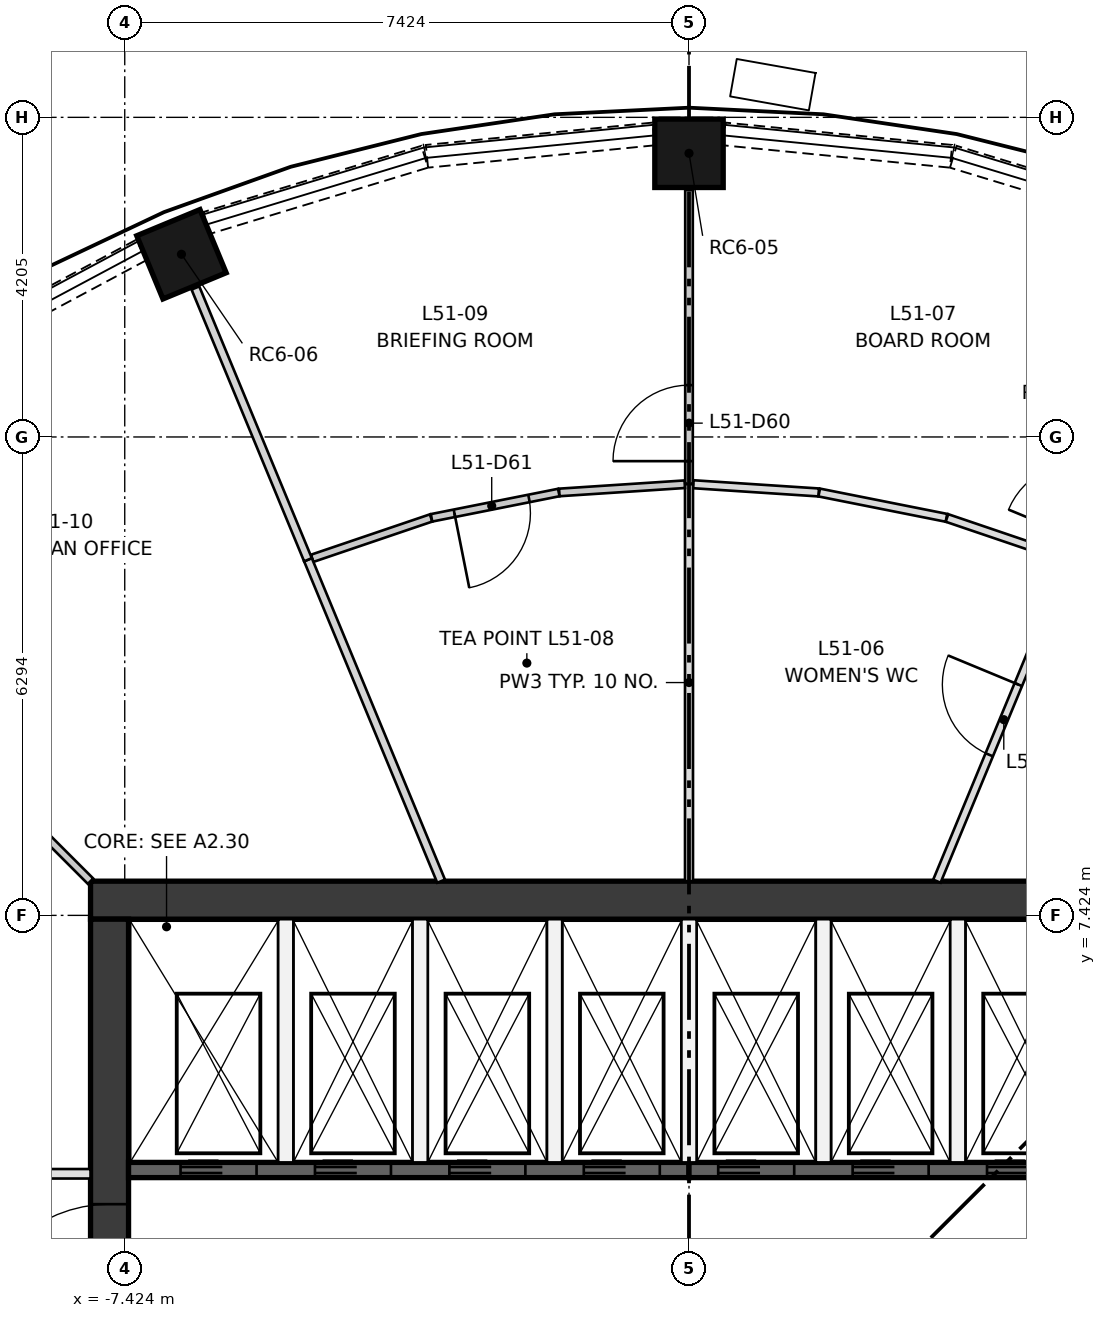
"""IFC4 building model, lengths in metres.
Left out: names, types, materials, properties, quantities, classifications, styles, units other than length and angle.
Written with IfcOpenShell. Run it as: python <this file> out.ifc"""

import sys

from ifc_helpers import new_model, si_unit, direction, frame, frame_2d, origin, origin_2d, place, context, subcontext, project, spatial, rectangle, extrude, element, fill, save


model = new_model("IFC4")
c1 = context("Model", 3, precision=1e-05, world=origin(), true_north=direction((0.0, 1.0)))
c2 = subcontext(c1, "Body", "Model", "MODEL_VIEW")
j1 = project(units=[si_unit("LENGTHUNIT", "METRE"), si_unit("PLANEANGLEUNIT", "RADIAN")], contexts=[c1])
p1 = place(None, origin())
s1 = spatial("IfcSite", under=j1, at=p1, CompositionType="ELEMENT")
p2 = place(p1, origin())
s2 = spatial("IfcBuilding", under=s1, at=p2, CompositionType="ELEMENT")
p3 = place(p2, frame((0.0, 0.0, 191.0)))
s3 = spatial("IfcBuildingStorey", under=s2, at=p3, CompositionType="ELEMENT", Elevation=191.0)
for number, where, z_axis, x_axis in (
    (1, (0.0, 17.45, 0.0), (0.0, 0.0, 1.0), (0.0, 1.0, 0.0)),
    (2, (-6.678, 16.122, 0.0), (0.0, 0.0, 1.0), (-0.383, 0.924, 0.0)),
):
    element("IfcColumn", number, at=place(p3, frame(where, z_axis=z_axis, x_axis=x_axis)), inside=s3, PredefinedType="COLUMN", context=c2, shape_type="SweptSolid", body=[
        extrude(rectangle(XDim=0.9, YDim=0.9, at=origin_2d()), origin(), (0.0, 0.0, 1.0), 2.85),
    ])
p4 = place(p3, frame((-7.874, 7.624, 0.0), z_axis=(0.0, 0.0, 1.0), x_axis=(1.0, 0.0, 0.0)))
e3 = element("IfcWall", 3, at=p4, inside=s3, PredefinedType="SHEAR", context=c2, shape_type="SweptSolid", body=[
    extrude(rectangle(XDim=15.748, YDim=0.5, at=frame_2d((7.874, 0.0))), origin(), (0.0, 0.0, 1.0), 3.35),
])
p5 = place(p3, frame((-7.624, -7.374, 0.0), z_axis=(0.0, 0.0, 1.0), x_axis=(0.0, 1.0, 0.0)))
e4 = element("IfcWall", 4, at=p5, inside=s3, PredefinedType="SHEAR", context=c2, shape_type="SweptSolid", body=[
    extrude(rectangle(XDim=14.748, YDim=0.5, at=frame_2d((7.374, 0.0))), origin(), (0.0, 0.0, 1.0), 3.35),
])
p6 = place(p5, frame((6.874, 0.0, 0.0)))
e5 = element("IfcOpeningElement", 5, at=p6, cuts=e4, PredefinedType="OPENING", context=c2, shape_type="SweptSolid", body=[
    extrude(rectangle(XDim=1.0, YDim=2.1, at=frame_2d((0.5, 1.05))), frame((0.0, 0.26, 0.0), z_axis=(0.0, -1.0, 0.0), x_axis=(1.0, 0.0, 0.0)), (0.0, 0.0, 1.0), 0.52),
])
p7 = place(p5, frame((3.75, 0.0, 0.0)))
e6 = element("IfcOpeningElement", 6, at=p7, cuts=e4, PredefinedType="OPENING", context=c2, shape_type="SweptSolid", body=[
    extrude(rectangle(XDim=1.8, YDim=2.1, at=frame_2d((0.9, 1.05))), frame((0.0, 0.26, 0.0), z_axis=(0.0, -1.0, 0.0), x_axis=(1.0, 0.0, 0.0)), (0.0, 0.0, 1.0), 0.52),
])
p8 = place(p5, frame((9.198, 0.0, 0.0)))
e7 = element("IfcOpeningElement", 7, at=p8, cuts=e4, PredefinedType="OPENING", context=c2, shape_type="SweptSolid", body=[
    extrude(rectangle(XDim=1.8, YDim=2.1, at=frame_2d((0.9, 1.05))), frame((0.0, 0.26, 0.0), z_axis=(0.0, -1.0, 0.0), x_axis=(1.0, 0.0, 0.0)), (0.0, 0.0, 1.0), 0.52),
])
p9 = place(p3, frame((-7.374, 4.074, 0.0), z_axis=(0.0, 0.0, 1.0), x_axis=(1.0, 0.0, 0.0)))
e8 = element("IfcWall", 8, at=p9, inside=s3, PredefinedType="SHEAR", context=c2, shape_type="SweptSolid", body=[
    extrude(rectangle(XDim=7.374, YDim=0.2, at=frame_2d((3.687, 0.0))), origin(), (0.0, 0.0, 1.0), 3.0),
])
p10 = place(p9, frame((0.684, 0.0, 0.0)))
e9 = element("IfcOpeningElement", 9, at=p10, cuts=e8, PredefinedType="OPENING", context=c2, shape_type="SweptSolid", body=[
    extrude(rectangle(XDim=1.0, YDim=2.1, at=frame_2d((0.5, 1.05))), frame((0.0, 0.11, 0.0), z_axis=(0.0, -1.0, 0.0), x_axis=(1.0, 0.0, 0.0)), (0.0, 0.0, 1.0), 0.22),
])
p11 = place(p9, frame((2.453, 0.0, 0.0)))
e10 = element("IfcOpeningElement", 10, at=p11, cuts=e8, PredefinedType="OPENING", context=c2, shape_type="SweptSolid", body=[
    extrude(rectangle(XDim=1.0, YDim=2.1, at=frame_2d((0.5, 1.05))), frame((0.0, 0.11, 0.0), z_axis=(0.0, -1.0, 0.0), x_axis=(1.0, 0.0, 0.0)), (0.0, 0.0, 1.0), 0.22),
])
p12 = place(p9, frame((4.221, 0.0, 0.0)))
e11 = element("IfcOpeningElement", 11, at=p12, cuts=e8, PredefinedType="OPENING", context=c2, shape_type="SweptSolid", body=[
    extrude(rectangle(XDim=1.0, YDim=2.1, at=frame_2d((0.5, 1.05))), frame((0.0, 0.11, 0.0), z_axis=(0.0, -1.0, 0.0), x_axis=(1.0, 0.0, 0.0)), (0.0, 0.0, 1.0), 0.22),
])
p13 = place(p9, frame((5.99, 0.0, 0.0)))
e12 = element("IfcOpeningElement", 12, at=p13, cuts=e8, PredefinedType="OPENING", context=c2, shape_type="SweptSolid", body=[
    extrude(rectangle(XDim=1.0, YDim=2.1, at=frame_2d((0.5, 1.05))), frame((0.0, 0.11, 0.0), z_axis=(0.0, -1.0, 0.0), x_axis=(1.0, 0.0, 0.0)), (0.0, 0.0, 1.0), 0.22),
])
p14 = place(p3, frame((0.0, 4.074, 0.0), z_axis=(0.0, 0.0, 1.0), x_axis=(1.0, 0.0, 0.0)))
e13 = element("IfcWall", 13, at=p14, inside=s3, PredefinedType="SHEAR", context=c2, shape_type="SweptSolid", body=[
    extrude(rectangle(XDim=7.374, YDim=0.2, at=frame_2d((3.687, 0.0))), origin(), (0.0, 0.0, 1.0), 3.0),
])
p15 = place(p14, frame((0.384, 0.0, 0.0)))
e14 = element("IfcOpeningElement", 14, at=p15, cuts=e13, PredefinedType="OPENING", context=c2, shape_type="SweptSolid", body=[
    extrude(rectangle(XDim=1.0, YDim=2.1, at=frame_2d((0.5, 1.05))), frame((0.0, 0.11, 0.0), z_axis=(0.0, -1.0, 0.0), x_axis=(1.0, 0.0, 0.0)), (0.0, 0.0, 1.0), 0.22),
])
p16 = place(p14, frame((2.153, 0.0, 0.0)))
e15 = element("IfcOpeningElement", 15, at=p16, cuts=e13, PredefinedType="OPENING", context=c2, shape_type="SweptSolid", body=[
    extrude(rectangle(XDim=1.0, YDim=2.1, at=frame_2d((0.5, 1.05))), frame((0.0, 0.11, 0.0), z_axis=(0.0, -1.0, 0.0), x_axis=(1.0, 0.0, 0.0)), (0.0, 0.0, 1.0), 0.22),
])
p17 = place(p14, frame((3.921, 0.0, 0.0)))
e16 = element("IfcOpeningElement", 16, at=p17, cuts=e13, PredefinedType="OPENING", context=c2, shape_type="SweptSolid", body=[
    extrude(rectangle(XDim=1.0, YDim=2.1, at=frame_2d((0.5, 1.05))), frame((0.0, 0.11, 0.0), z_axis=(0.0, -1.0, 0.0), x_axis=(1.0, 0.0, 0.0)), (0.0, 0.0, 1.0), 0.22),
])
p18 = place(p14, frame((5.79, 0.0, 0.0)))
e17 = element("IfcOpeningElement", 17, at=p18, cuts=e13, PredefinedType="OPENING", context=c2, shape_type="SweptSolid", body=[
    extrude(rectangle(XDim=0.8, YDim=2.1, at=frame_2d((0.4, 1.05))), frame((0.0, 0.11, 0.0), z_axis=(0.0, -1.0, 0.0), x_axis=(1.0, 0.0, 0.0)), (0.0, 0.0, 1.0), 0.22),
])
for number, where, z_axis, x_axis in (
    (18, (-5.305, 4.174, 0.0), (0.0, 0.0, 1.0), (0.0, 1.0, 0.0)),
    (19, (-3.537, 4.174, 0.0), (0.0, 0.0, 1.0), (0.0, 1.0, 0.0)),
    (20, (-1.769, 4.174, 0.0), (0.0, 0.0, 1.0), (0.0, 1.0, 0.0)),
    (21, (0.0, 4.174, 0.0), (0.0, 0.0, 1.0), (0.0, 1.0, 0.0)),
    (22, (1.769, 4.174, 0.0), (0.0, 0.0, 1.0), (0.0, 1.0, 0.0)),
    (23, (3.537, 4.174, 0.0), (0.0, 0.0, 1.0), (0.0, 1.0, 0.0)),
):
    element("IfcWall", number, at=place(p3, frame(where, z_axis=z_axis, x_axis=x_axis)), inside=s3, PredefinedType="PARTITIONING", context=c2, shape_type="SweptSolid", body=[
        extrude(rectangle(XDim=3.2, YDim=0.2, at=frame_2d((1.6, 0.0))), origin(), (0.0, 0.0, 1.0), 3.0),
    ])
p19 = place(p3, frame((6.347, 16.533, 0.0), z_axis=(0.0, 0.0, 1.0), x_axis=(-0.95687774785, 0.290490921835, 0.0)))
e24 = element("IfcWall", 24, at=p19, inside=s3, PredefinedType="SOLIDWALL", context=c2, shape_type="SweptSolid", body=[
    extrude(rectangle(XDim=2.999, YDim=0.3, at=frame_2d((1.5, 0.0))), origin(), (0.0, 0.0, 1.0), 0.9),
])
for number, where, z_axis, x_axis in (
    (25, (3.448, 17.41, 0.0), (0.0, 0.0, 1.0), (-0.995, 0.098, 0.0)),
    (26, (-0.464, 17.705, 0.0), (0.0, 0.0, 1.0), (-0.995, -0.098, 0.0)),
):
    element("IfcWall", number, at=place(p3, frame(where, z_axis=z_axis, x_axis=x_axis)), inside=s3, PredefinedType="SOLIDWALL", context=c2, shape_type="SweptSolid", body=[
        extrude(rectangle(XDim=2.999, YDim=0.3, at=frame_2d((1.499, 0.0))), origin(), (0.0, 0.0, 1.0), 0.9),
    ])
p20 = place(p3, frame((-3.477, 17.405, 0.0), z_axis=(0.0, 0.0, 1.0), x_axis=(-0.95687774785, -0.290490921835, 0.0)))
e27 = element("IfcWall", 27, at=p20, inside=s3, PredefinedType="SOLIDWALL", context=c2, shape_type="SweptSolid", body=[
    extrude(rectangle(XDim=2.999, YDim=0.3, at=frame_2d((1.5, 0.0))), origin(), (0.0, 0.0, 1.0), 0.9),
])
p21 = place(p3, frame((-7.204, 16.179, 0.0), z_axis=(0.0, 0.0, 1.0), x_axis=(-0.881827169278, -0.471572734074, 0.0)))
e28 = element("IfcWall", 28, at=p21, inside=s3, PredefinedType="SOLIDWALL", context=c2, shape_type="SweptSolid", body=[
    extrude(rectangle(XDim=2.998, YDim=0.3, at=frame_2d((1.499, 0.0))), origin(), (0.0, 0.0, 1.0), 0.9),
])
p22 = place(p3, frame((-11.087, 4.024, 0.0), z_axis=(0.0, 0.0, 1.0), x_axis=(1.0, 0.0, 0.0)))
e29 = element("IfcWall", 29, at=p22, inside=s3, PredefinedType="PARTITIONING", context=c2, shape_type="SweptSolid", body=[
    extrude(rectangle(XDim=3.213, YDim=0.125, at=frame_2d((1.606, 0.0))), origin(), (0.0, 0.0, 1.0), 3.0),
])
p23 = place(p22, frame((1.1, 0.0, 0.0)))
e30 = element("IfcOpeningElement", 30, at=p23, cuts=e29, PredefinedType="OPENING", context=c2, shape_type="SweptSolid", body=[
    extrude(rectangle(XDim=1.0, YDim=2.1, at=frame_2d((0.5, 1.05))), frame((0.0, 0.073, 0.0), z_axis=(0.0, -1.0, 0.0), x_axis=(1.0, 0.0, 0.0)), (0.0, 0.0, 1.0), 0.145),
])
p24 = place(p3, frame((3.261, 7.874, 0.0), z_axis=(0.0, 0.0, 1.0), x_axis=(0.382701956612, 0.923871859299, 0.0)))
e31 = element("IfcWall", 31, at=p24, inside=s3, PredefinedType="PARTITIONING", context=c2, shape_type="SweptSolid", body=[
    extrude(rectangle(XDim=4.577, YDim=0.105, at=frame_2d((2.289, 0.0))), origin(), (0.0, 0.0, 1.0), 3.0),
])
p25 = place(p24, frame((1.8, 0.0, 0.0)))
e32 = element("IfcOpeningElement", 32, at=p25, cuts=e31, PredefinedType="OPENING", context=c2, shape_type="SweptSolid", body=[
    extrude(rectangle(XDim=1.0, YDim=2.1, at=frame_2d((0.5, 1.05))), frame((0.0, 0.062, 0.0), z_axis=(0.0, -1.0, 0.0), x_axis=(1.0, 0.0, 0.0)), (0.0, 0.0, 1.0), 0.125),
])
p26 = place(p3, frame((0.056, 13.096, 0.0), z_axis=(0.0, 0.0, 1.0), x_axis=(0.997860265299, -0.06538265013, 0.0)))
e33 = element("IfcWall", 33, at=p26, inside=s3, PredefinedType="PARTITIONING", context=c2, shape_type="SweptSolid", body=[
    extrude(rectangle(XDim=1.654, YDim=0.105, at=frame_2d((0.827, 0.0))), origin(), (0.0, 0.0, 1.0), 3.0),
])
p27 = place(p3, frame((1.713, 12.987, 0.0), z_axis=(0.0, 0.0, 1.0), x_axis=(0.980778250333, -0.195125661239, 0.0)))
e34 = element("IfcWall", 34, at=p27, inside=s3, PredefinedType="PARTITIONING", context=c2, shape_type="SweptSolid", body=[
    extrude(rectangle(XDim=1.707, YDim=0.105, at=frame_2d((0.853, 0.0))), origin(), (0.0, 0.0, 1.0), 3.0),
])
p28 = place(p3, frame((3.394, 12.653, 0.0), z_axis=(0.0, 0.0, 1.0), x_axis=(0.946927367808, -0.321447600855, 0.0)))
e35 = element("IfcWall", 35, at=p28, inside=s3, PredefinedType="PARTITIONING", context=c2, shape_type="SweptSolid", body=[
    extrude(rectangle(XDim=1.654, YDim=0.105, at=frame_2d((0.827, 0.0))), origin(), (0.0, 0.0, 1.0), 3.0),
])
p29 = place(p3, frame((0.0, 7.874, 0.0), z_axis=(0.0, 0.0, 1.0), x_axis=(0.0, 1.0, 0.0)))
e36 = element("IfcWall", 36, at=p29, inside=s3, PredefinedType="PARTITIONING", context=c2, shape_type="SweptSolid", body=[
    extrude(rectangle(XDim=5.226, YDim=0.105, at=frame_2d((2.613, 0.0))), origin(), (0.0, 0.0, 1.0), 3.0),
])
p30 = place(p3, frame((0.0, 13.1, 0.0), z_axis=(0.0, 0.0, 1.0), x_axis=(0.0, 1.0, 0.0)))
e37 = element("IfcWall", 37, at=p30, inside=s3, PredefinedType="PARTITIONING", context=c2, shape_type="SweptSolid", body=[
    extrude(rectangle(XDim=3.87, YDim=0.1, at=frame_2d((1.935, 0.0))), origin(), (0.0, 0.0, 1.0), 3.0),
])
p31 = place(p30, frame((0.3, 0.0, 0.0)))
e38 = element("IfcOpeningElement", 38, at=p31, cuts=e37, PredefinedType="OPENING", context=c2, shape_type="SweptSolid", body=[
    extrude(rectangle(XDim=1.0, YDim=2.1, at=frame_2d((0.5, 1.05))), frame((0.0, 0.06, 0.0), z_axis=(0.0, -1.0, 0.0), x_axis=(1.0, 0.0, 0.0)), (0.0, 0.0, 1.0), 0.12),
])
p32 = place(p3, frame((-4.958, 12.122, 0.0), z_axis=(0.0, 0.0, 1.0), x_axis=(0.94694015461, 0.321409930755, 0.0)))
e39 = element("IfcWall", 39, at=p32, inside=s3, PredefinedType="PARTITIONING", context=c2, shape_type="SweptSolid", body=[
    extrude(rectangle(XDim=1.652, YDim=0.1, at=frame_2d((0.826, 0.0))), origin(), (0.0, 0.0, 1.0), 3.0),
])
p33 = place(p3, frame((-1.713, 12.987, 0.0), z_axis=(0.0, 0.0, 1.0), x_axis=(-0.980783695828, -0.195098288043, 0.0)))
e40 = element("IfcWall", 40, at=p33, inside=s3, PredefinedType="PARTITIONING", context=c2, shape_type="SweptSolid", body=[
    extrude(rectangle(XDim=1.707, YDim=0.1, at=frame_2d((0.854, 0.0))), origin(), (0.0, 0.0, 1.0), 3.0),
])
p34 = place(p33, frame((0.4, 0.0, 0.0)))
e41 = element("IfcOpeningElement", 41, at=p34, cuts=e40, PredefinedType="OPENING", context=c2, shape_type="SweptSolid", body=[
    extrude(rectangle(XDim=1.0, YDim=2.1, at=frame_2d((0.5, 1.05))), frame((0.0, 0.06, 0.0), z_axis=(0.0, -1.0, 0.0), x_axis=(1.0, 0.0, 0.0)), (0.0, 0.0, 1.0), 0.12),
])
p35 = place(p3, frame((-1.707, 12.988, 0.0), z_axis=(0.0, 0.0, 1.0), x_axis=(0.997860265299, 0.06538265013, 0.0)))
e42 = element("IfcWall", 42, at=p35, inside=s3, PredefinedType="PARTITIONING", context=c2, shape_type="SweptSolid", body=[
    extrude(rectangle(XDim=1.654, YDim=0.1, at=frame_2d((0.827, 0.0))), origin(), (0.0, 0.0, 1.0), 3.0),
])
p36 = place(p3, frame((-3.261, 7.874, 0.0), z_axis=(0.0, 0.0, 1.0), x_axis=(-0.382701956612, 0.923871859299, 0.0)))
e43 = element("IfcWall", 43, at=p36, inside=s3, PredefinedType="PARTITIONING", context=c2, shape_type="SweptSolid", body=[
    extrude(rectangle(XDim=4.577, YDim=0.11, at=frame_2d((2.289, 0.0))), origin(), (0.0, 0.0, 1.0), 3.0),
])
p37 = place(p3, frame((-5.013, 12.103, 0.0), z_axis=(0.0, 0.0, 1.0), x_axis=(-0.382674944996, 0.923883048049, 0.0)))
e44 = element("IfcWall", 44, at=p37, inside=s3, PredefinedType="PARTITIONING", context=c2, shape_type="SweptSolid", body=[
    extrude(rectangle(XDim=3.87, YDim=0.11, at=frame_2d((1.935, 0.0))), origin(), (0.0, 0.0, 1.0), 3.0),
])
p38 = place(p3, frame((-12.0, 12.0, 0.0), z_axis=(0.0, 0.0, 1.0), x_axis=(0.707106781187, -0.707106781187, 0.0)))
e45 = element("IfcWall", 45, at=p38, inside=s3, PredefinedType="PARTITIONING", context=c2, shape_type="SweptSolid", body=[
    extrude(rectangle(XDim=5.834, YDim=0.1, at=frame_2d((2.917, 0.0))), origin(), (0.0, 0.0, 1.0), 3.0),
])
p39 = place(p38, frame((3.0, 0.0, 0.0)))
e46 = element("IfcOpeningElement", 46, at=p39, cuts=e45, PredefinedType="OPENING", context=c2, shape_type="SweptSolid", body=[
    extrude(rectangle(XDim=1.0, YDim=2.1, at=frame_2d((0.5, 1.05))), frame((0.0, 0.06, 0.0), z_axis=(0.0, -1.0, 0.0), x_axis=(1.0, 0.0, 0.0)), (0.0, 0.0, 1.0), 0.12),
])
p40 = place(p10, frame((1.0, 0.0, 0.0), z_axis=(0.0, 0.0, 1.0), x_axis=(-1.0, 0.0, 0.0)))
e47 = element("IfcDoor", 47, at=p40, inside=s3, OperationType="DOUBLE_DOOR_SLIDING", PredefinedType="DOOR", context=c2, shape_type="SweptSolid", body=[
    extrude(rectangle(XDim=1.0, YDim=2.1, at=frame_2d((0.5, 1.05))), frame((0.0, 0.025, 0.0), z_axis=(0.0, -1.0, 0.0), x_axis=(1.0, 0.0, 0.0)), (0.0, 0.0, 1.0), 0.05),
])
fill(e9, e47)
p41 = place(p11, frame((1.0, 0.0, 0.0), z_axis=(0.0, 0.0, 1.0), x_axis=(-1.0, 0.0, 0.0)))
e48 = element("IfcDoor", 48, at=p41, inside=s3, OperationType="DOUBLE_DOOR_SLIDING", PredefinedType="DOOR", context=c2, shape_type="SweptSolid", body=[
    extrude(rectangle(XDim=1.0, YDim=2.1, at=frame_2d((0.5, 1.05))), frame((0.0, 0.025, 0.0), z_axis=(0.0, -1.0, 0.0), x_axis=(1.0, 0.0, 0.0)), (0.0, 0.0, 1.0), 0.05),
])
fill(e10, e48)
p42 = place(p12, frame((1.0, 0.0, 0.0), z_axis=(0.0, 0.0, 1.0), x_axis=(-1.0, 0.0, 0.0)))
e49 = element("IfcDoor", 49, at=p42, inside=s3, OperationType="DOUBLE_DOOR_SLIDING", PredefinedType="DOOR", context=c2, shape_type="SweptSolid", body=[
    extrude(rectangle(XDim=1.0, YDim=2.1, at=frame_2d((0.5, 1.05))), frame((0.0, 0.025, 0.0), z_axis=(0.0, -1.0, 0.0), x_axis=(1.0, 0.0, 0.0)), (0.0, 0.0, 1.0), 0.05),
])
fill(e11, e49)
p43 = place(p13, frame((1.0, 0.0, 0.0), z_axis=(0.0, 0.0, 1.0), x_axis=(-1.0, 0.0, 0.0)))
e50 = element("IfcDoor", 50, at=p43, inside=s3, OperationType="DOUBLE_DOOR_SLIDING", PredefinedType="DOOR", context=c2, shape_type="SweptSolid", body=[
    extrude(rectangle(XDim=1.0, YDim=2.1, at=frame_2d((0.5, 1.05))), frame((0.0, 0.025, 0.0), z_axis=(0.0, -1.0, 0.0), x_axis=(1.0, 0.0, 0.0)), (0.0, 0.0, 1.0), 0.05),
])
fill(e12, e50)
p44 = place(p15, frame((1.0, 0.0, 0.0), z_axis=(0.0, 0.0, 1.0), x_axis=(-1.0, 0.0, 0.0)))
e51 = element("IfcDoor", 51, at=p44, inside=s3, OperationType="DOUBLE_DOOR_SLIDING", PredefinedType="DOOR", context=c2, shape_type="SweptSolid", body=[
    extrude(rectangle(XDim=1.0, YDim=2.1, at=frame_2d((0.5, 1.05))), frame((0.0, 0.025, 0.0), z_axis=(0.0, -1.0, 0.0), x_axis=(1.0, 0.0, 0.0)), (0.0, 0.0, 1.0), 0.05),
])
fill(e14, e51)
p45 = place(p16, frame((1.0, 0.0, 0.0), z_axis=(0.0, 0.0, 1.0), x_axis=(-1.0, 0.0, 0.0)))
e52 = element("IfcDoor", 52, at=p45, inside=s3, OperationType="DOUBLE_DOOR_SLIDING", PredefinedType="DOOR", context=c2, shape_type="SweptSolid", body=[
    extrude(rectangle(XDim=1.0, YDim=2.1, at=frame_2d((0.5, 1.05))), frame((0.0, 0.025, 0.0), z_axis=(0.0, -1.0, 0.0), x_axis=(1.0, 0.0, 0.0)), (0.0, 0.0, 1.0), 0.05),
])
fill(e15, e52)
p46 = place(p17, frame((1.0, 0.0, 0.0), z_axis=(0.0, 0.0, 1.0), x_axis=(-1.0, 0.0, 0.0)))
e53 = element("IfcDoor", 53, at=p46, inside=s3, OperationType="DOUBLE_DOOR_SLIDING", PredefinedType="DOOR", context=c2, shape_type="SweptSolid", body=[
    extrude(rectangle(XDim=1.0, YDim=2.1, at=frame_2d((0.5, 1.05))), frame((0.0, 0.025, 0.0), z_axis=(0.0, -1.0, 0.0), x_axis=(1.0, 0.0, 0.0)), (0.0, 0.0, 1.0), 0.05),
])
fill(e16, e53)
p47 = place(p8, origin())
e54 = element("IfcDoor", 54, at=p47, inside=s3, OperationType="DOUBLE_DOOR_SINGLE_SWING", PredefinedType="DOOR", context=c2, shape_type="SweptSolid", body=[
    extrude(rectangle(XDim=1.8, YDim=2.1, at=frame_2d((0.9, 1.05))), frame((0.0, 0.025, 0.0), z_axis=(0.0, -1.0, 0.0), x_axis=(1.0, 0.0, 0.0)), (0.0, 0.0, 1.0), 0.05),
])
fill(e7, e54)
p48 = place(p25, origin())
e55 = element("IfcDoor", 55, at=p48, inside=s3, OperationType="SINGLE_SWING_RIGHT", PredefinedType="DOOR", context=c2, shape_type="SweptSolid", body=[
    extrude(rectangle(XDim=1.0, YDim=2.1, at=frame_2d((0.5, 1.05))), frame((0.0, 0.025, 0.0), z_axis=(0.0, -1.0, 0.0), x_axis=(1.0, 0.0, 0.0)), (0.0, 0.0, 1.0), 0.05),
])
fill(e32, e55)
p49 = place(p31, origin())
e56 = element("IfcDoor", 56, at=p49, inside=s3, OperationType="SINGLE_SWING_LEFT", PredefinedType="DOOR", context=c2, shape_type="SweptSolid", body=[
    extrude(rectangle(XDim=1.0, YDim=2.1, at=frame_2d((0.5, 1.05))), frame((0.0, 0.025, 0.0), z_axis=(0.0, -1.0, 0.0), x_axis=(1.0, 0.0, 0.0)), (0.0, 0.0, 1.0), 0.05),
])
fill(e38, e56)
p50 = place(p34, origin())
e57 = element("IfcDoor", 57, at=p50, inside=s3, OperationType="SINGLE_SWING_RIGHT", PredefinedType="DOOR", context=c2, shape_type="SweptSolid", body=[
    extrude(rectangle(XDim=1.0, YDim=2.1, at=frame_2d((0.5, 1.05))), frame((0.0, 0.025, 0.0), z_axis=(0.0, -1.0, 0.0), x_axis=(1.0, 0.0, 0.0)), (0.0, 0.0, 1.0), 0.05),
])
fill(e41, e57)
save(model, sys.argv[1])
